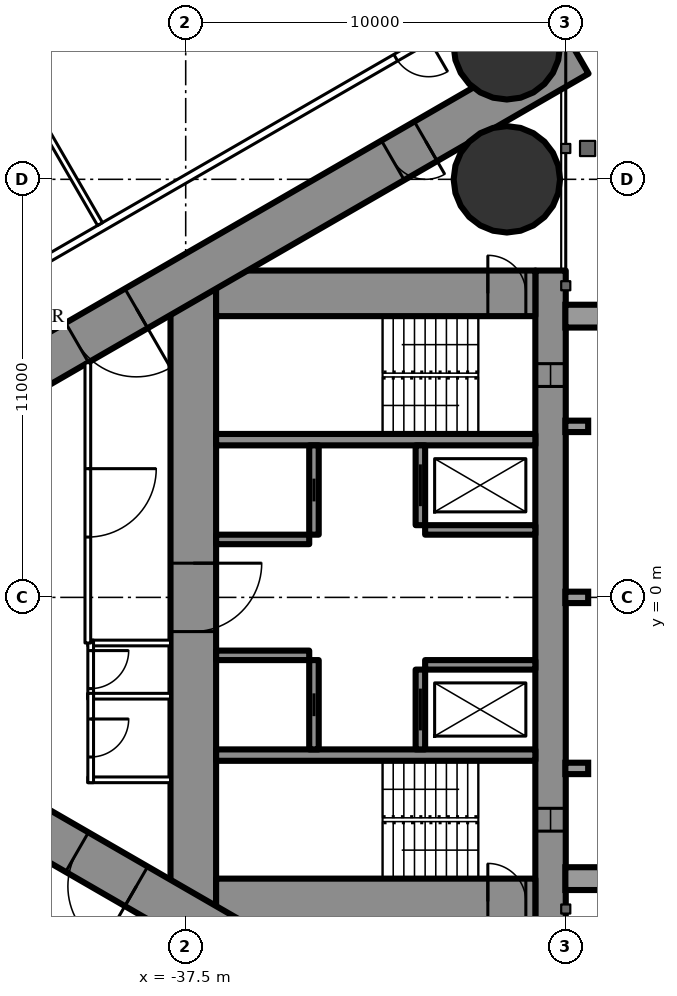
"""IFC4 building model, lengths in metres.
Left out: names, types, materials, properties, quantities, classifications, styles, units other than length and angle.
Written with IfcOpenShell. Run it as: python <this file> out.ifc"""

import sys

from ifc_helpers import new_model, si_unit, direction, frame, frame_2d, origin, origin_2d, place, context, subcontext, project, spatial, rectangle, circle, extrude, element, fill, save


model = new_model("IFC4")
c1 = context("Model", 3, precision=1e-05, world=origin(), true_north=direction((0.0, 1.0)))
c2 = subcontext(c1, "Body", "Model", "MODEL_VIEW")
j1 = project(units=[si_unit("LENGTHUNIT", "METRE"), si_unit("PLANEANGLEUNIT", "RADIAN")], contexts=[c1])
p1 = place(None, origin())
s1 = spatial("IfcSite", under=j1, at=p1, CompositionType="ELEMENT")
p2 = place(p1, origin())
s2 = spatial("IfcBuilding", under=s1, at=p2, CompositionType="ELEMENT")
p3 = place(p2, frame((0.0, 0.0, 173.8)))
s3 = spatial("IfcBuildingStorey", under=s2, at=p3, CompositionType="ELEMENT", Elevation=173.8)
for number, where, z_axis, x_axis in (
    (1, (-29.05, 11.0, 0.0), (0.0, 0.0, 1.0), (1.0, 0.0, 0.0)),
    (2, (-29.05, 14.5, 0.0), (0.0, 0.0, 1.0), (1.0, 0.0, 0.0)),
):
    element("IfcColumn", number, at=place(p3, frame(where, z_axis=z_axis, x_axis=x_axis)), inside=s3, PredefinedType="COLUMN", context=c2, shape_type="SweptSolid", body=[
        extrude(circle(Radius=1.4, at=origin_2d()), origin(), (0.0, 0.0, 1.0), 3.5),
    ])
p4 = place(p3, frame((-27.9, 8.6, 0.0), z_axis=(0.0, 0.0, 1.0), x_axis=(0.0, -1.0, 0.0)))
e3 = element("IfcWall", 3, at=p4, inside=s3, PredefinedType="SHEAR", context=c2, shape_type="SweptSolid", body=[
    extrude(rectangle(XDim=17.2, YDim=0.8, at=frame_2d((8.6, 0.0))), origin(), (0.0, 0.0, 1.0), 3.5),
])
p5 = place(p4, frame((2.45, 0.0, 0.6)))
e4 = element("IfcOpeningElement", 4, at=p5, cuts=e3, PredefinedType="OPENING", context=c2, shape_type="SweptSolid", body=[
    extrude(rectangle(XDim=0.6, YDim=2.1, at=frame_2d((0.3, 1.05))), frame((0.0, 0.41, 0.0), z_axis=(0.0, -1.0, 0.0), x_axis=(1.0, 0.0, 0.0)), (0.0, 0.0, 1.0), 0.82),
])
p6 = place(p4, frame((14.15, 0.0, 0.6)))
e5 = element("IfcOpeningElement", 5, at=p6, cuts=e3, PredefinedType="OPENING", context=c2, shape_type="SweptSolid", body=[
    extrude(rectangle(XDim=0.6, YDim=2.1, at=frame_2d((0.3, 1.05))), frame((0.0, 0.41, 0.0), z_axis=(0.0, -1.0, 0.0), x_axis=(1.0, 0.0, 0.0)), (0.0, 0.0, 1.0), 0.82),
])
p7 = place(p3, frame((-37.3, 8.6, 0.0), z_axis=(0.0, 0.0, 1.0), x_axis=(0.0, -1.0, 0.0)))
e6 = element("IfcWall", 6, at=p7, inside=s3, PredefinedType="SHEAR", context=c2, shape_type="SweptSolid", body=[
    extrude(rectangle(XDim=17.2, YDim=1.2, at=frame_2d((8.6, 0.0))), origin(), (0.0, 0.0, 1.0), 3.5),
])
p8 = place(p7, frame((7.7, 0.0, 0.0)))
e7 = element("IfcOpeningElement", 7, at=p8, cuts=e6, PredefinedType="OPENING", context=c2, shape_type="SweptSolid", body=[
    extrude(rectangle(XDim=1.8, YDim=2.2, at=frame_2d((0.9, 1.1))), frame((0.0, 0.61, 0.0), z_axis=(0.0, -1.0, 0.0), x_axis=(1.0, 0.0, 0.0)), (0.0, 0.0, 1.0), 1.22),
])
p9 = place(p3, frame((-28.3, 8.0, 0.0), z_axis=(0.0, 0.0, 1.0), x_axis=(-1.0, 0.0, 0.0)))
e8 = element("IfcWall", 8, at=p9, inside=s3, PredefinedType="SHEAR", context=c2, shape_type="SweptSolid", body=[
    extrude(rectangle(XDim=8.4, YDim=1.2, at=frame_2d((4.2, 0.0))), origin(), (0.0, 0.0, 1.0), 3.5),
])
p10 = place(p9, frame((0.25, 0.0, 0.0)))
e9 = element("IfcOpeningElement", 9, at=p10, cuts=e8, PredefinedType="OPENING", context=c2, shape_type="SweptSolid", body=[
    extrude(rectangle(XDim=1.0, YDim=2.2, at=frame_2d((0.5, 1.1))), frame((0.0, 0.61, 0.0), z_axis=(0.0, -1.0, 0.0), x_axis=(1.0, 0.0, 0.0)), (0.0, 0.0, 1.0), 1.22),
])
p11 = place(p3, frame((-28.3, -8.0, 0.0), z_axis=(0.0, 0.0, 1.0), x_axis=(-1.0, 0.0, 0.0)))
e10 = element("IfcWall", 10, at=p11, inside=s3, PredefinedType="SHEAR", context=c2, shape_type="SweptSolid", body=[
    extrude(rectangle(XDim=8.4, YDim=1.2, at=frame_2d((4.2, 0.0))), origin(), (0.0, 0.0, 1.0), 3.5),
])
p12 = place(p11, frame((0.25, 0.0, 0.0)))
e11 = element("IfcOpeningElement", 11, at=p12, cuts=e10, PredefinedType="OPENING", context=c2, shape_type="SweptSolid", body=[
    extrude(rectangle(XDim=1.0, YDim=2.2, at=frame_2d((0.5, 1.1))), frame((0.0, 0.61, 0.0), z_axis=(0.0, -1.0, 0.0), x_axis=(1.0, 0.0, 0.0)), (0.0, 0.0, 1.0), 1.22),
])
for number, where, z_axis, x_axis in (
    (12, (-28.3, 4.15, 0.0), (0.0, 0.0, 1.0), (-1.0, 0.0, 0.0)),
    (13, (-28.3, -4.15, 0.0), (0.0, 0.0, 1.0), (-1.0, 0.0, 0.0)),
):
    element("IfcWall", number, at=place(p3, frame(where, z_axis=z_axis, x_axis=x_axis)), inside=s3, PredefinedType="SHEAR", context=c2, shape_type="SweptSolid", body=[
        extrude(rectangle(XDim=8.4, YDim=0.3, at=frame_2d((4.2, 0.0))), origin(), (0.0, 0.0, 1.0), 3.5),
    ])
p13 = place(p3, frame((-31.325, 4.0, 0.0), z_axis=(0.0, 0.0, 1.0), x_axis=(0.0, -1.0, 0.0)))
e14 = element("IfcWall", 14, at=p13, inside=s3, PredefinedType="SHEAR", context=c2, shape_type="SweptSolid", body=[
    extrude(rectangle(XDim=2.1, YDim=0.25, at=frame_2d((1.05, 0.0))), origin(), (0.0, 0.0, 1.0), 3.5),
])
p14 = place(p13, frame((0.5, 0.0, 0.0)))
e15 = element("IfcOpeningElement", 15, at=p14, cuts=e14, PredefinedType="OPENING", context=c2, shape_type="SweptSolid", body=[
    extrude(rectangle(XDim=1.1, YDim=2.2, at=frame_2d((0.55, 1.1))), frame((0.0, 0.135, 0.0), z_axis=(0.0, -1.0, 0.0), x_axis=(1.0, 0.0, 0.0)), (0.0, 0.0, 1.0), 0.27),
])
p15 = place(p3, frame((-34.125, 4.0, 0.0), z_axis=(0.0, 0.0, 1.0), x_axis=(0.0, -1.0, 0.0)))
e16 = element("IfcWall", 16, at=p15, inside=s3, PredefinedType="SHEAR", context=c2, shape_type="SweptSolid", body=[
    extrude(rectangle(XDim=2.35, YDim=0.25, at=frame_2d((1.175, 0.0))), origin(), (0.0, 0.0, 1.0), 3.5),
])
p16 = place(p15, frame((0.875, 0.0, 0.0)))
e17 = element("IfcOpeningElement", 17, at=p16, cuts=e16, PredefinedType="OPENING", context=c2, shape_type="SweptSolid", body=[
    extrude(rectangle(XDim=0.6, YDim=2.0, at=frame_2d((0.3, 1.0))), frame((0.0, 0.135, 0.0), z_axis=(0.0, -1.0, 0.0), x_axis=(1.0, 0.0, 0.0)), (0.0, 0.0, 1.0), 0.27),
])
p17 = place(p3, frame((-28.3, 1.775, 0.0), z_axis=(0.0, 0.0, 1.0), x_axis=(-1.0, 0.0, 0.0)))
e18 = element("IfcWall", 18, at=p17, inside=s3, PredefinedType="SHEAR", context=c2, shape_type="SweptSolid", body=[
    extrude(rectangle(XDim=2.9, YDim=0.25, at=frame_2d((1.45, 0.0))), origin(), (0.0, 0.0, 1.0), 3.5),
])
p18 = place(p3, frame((-34.25, 1.525, 0.0), z_axis=(0.0, 0.0, 1.0), x_axis=(-1.0, 0.0, 0.0)))
e19 = element("IfcWall", 19, at=p18, inside=s3, PredefinedType="SHEAR", context=c2, shape_type="SweptSolid", body=[
    extrude(rectangle(XDim=2.45, YDim=0.25, at=frame_2d((1.225, 0.0))), origin(), (0.0, 0.0, 1.0), 3.5),
])
p19 = place(p3, frame((-31.325, -1.9, 0.0), z_axis=(0.0, 0.0, 1.0), x_axis=(0.0, -1.0, 0.0)))
e20 = element("IfcWall", 20, at=p19, inside=s3, PredefinedType="SHEAR", context=c2, shape_type="SweptSolid", body=[
    extrude(rectangle(XDim=2.1, YDim=0.25, at=frame_2d((1.05, 0.0))), origin(), (0.0, 0.0, 1.0), 3.5),
])
p20 = place(p19, frame((0.5, 0.0, 0.0)))
e21 = element("IfcOpeningElement", 21, at=p20, cuts=e20, PredefinedType="OPENING", context=c2, shape_type="SweptSolid", body=[
    extrude(rectangle(XDim=1.1, YDim=2.2, at=frame_2d((0.55, 1.1))), frame((0.0, 0.135, 0.0), z_axis=(0.0, -1.0, 0.0), x_axis=(1.0, 0.0, 0.0)), (0.0, 0.0, 1.0), 0.27),
])
p21 = place(p3, frame((-34.125, -1.65, 0.0), z_axis=(0.0, 0.0, 1.0), x_axis=(0.0, -1.0, 0.0)))
e22 = element("IfcWall", 22, at=p21, inside=s3, PredefinedType="SHEAR", context=c2, shape_type="SweptSolid", body=[
    extrude(rectangle(XDim=2.35, YDim=0.25, at=frame_2d((1.175, 0.0))), origin(), (0.0, 0.0, 1.0), 3.5),
])
p22 = place(p21, frame((0.875, 0.0, 0.0)))
e23 = element("IfcOpeningElement", 23, at=p22, cuts=e22, PredefinedType="OPENING", context=c2, shape_type="SweptSolid", body=[
    extrude(rectangle(XDim=0.6, YDim=2.0, at=frame_2d((0.3, 1.0))), frame((0.0, 0.135, 0.0), z_axis=(0.0, -1.0, 0.0), x_axis=(1.0, 0.0, 0.0)), (0.0, 0.0, 1.0), 0.27),
])
p23 = place(p3, frame((-28.3, -1.775, 0.0), z_axis=(0.0, 0.0, 1.0), x_axis=(-1.0, 0.0, 0.0)))
e24 = element("IfcWall", 24, at=p23, inside=s3, PredefinedType="SHEAR", context=c2, shape_type="SweptSolid", body=[
    extrude(rectangle(XDim=2.9, YDim=0.25, at=frame_2d((1.45, 0.0))), origin(), (0.0, 0.0, 1.0), 3.5),
])
p24 = place(p3, frame((-34.25, -1.525, 0.0), z_axis=(0.0, 0.0, 1.0), x_axis=(-1.0, 0.0, 0.0)))
e25 = element("IfcWall", 25, at=p24, inside=s3, PredefinedType="SHEAR", context=c2, shape_type="SweptSolid", body=[
    extrude(rectangle(XDim=2.45, YDim=0.25, at=frame_2d((1.225, 0.0))), origin(), (0.0, 0.0, 1.0), 3.5),
])
p25 = place(p3, frame((-27.2, 14.3, 0.0), z_axis=(0.0, 0.0, 1.0), x_axis=(-0.866026593062, -0.499997940104, 0.0)))
e26 = element("IfcWall", 26, at=p25, inside=s3, PredefinedType="SHEAR", context=c2, shape_type="SweptSolid", body=[
    extrude(rectangle(XDim=28.946, YDim=1.2, at=frame_2d((14.473, 0.0))), origin(), (0.0, 0.0, 1.0), 3.5),
])
p26 = place(p25, frame((4.6, 0.0, 0.0)))
e27 = element("IfcOpeningElement", 27, at=p26, cuts=e26, PredefinedType="OPENING", context=c2, shape_type="SweptSolid", body=[
    extrude(rectangle(XDim=1.0, YDim=2.2, at=frame_2d((0.5, 1.1))), frame((0.0, 0.61, 0.0), z_axis=(0.0, -1.0, 0.0), x_axis=(1.0, 0.0, 0.0)), (0.0, 0.0, 1.0), 1.22),
])
p27 = place(p25, frame((13.395, 0.0, 0.0)))
e28 = element("IfcOpeningElement", 28, at=p27, cuts=e26, PredefinedType="OPENING", context=c2, shape_type="SweptSolid", body=[
    extrude(rectangle(XDim=1.8, YDim=2.2, at=frame_2d((0.9, 1.1))), frame((0.0, 0.61, 0.0), z_axis=(0.0, -1.0, 0.0), x_axis=(1.0, 0.0, 0.0)), (0.0, 0.0, 1.0), 1.22),
])
p28 = place(p3, frame((-27.2, -14.3, 0.0), z_axis=(0.0, 0.0, 1.0), x_axis=(-0.866024021859, 0.500002393557, 0.0)))
e29 = element("IfcWall", 29, at=p28, inside=s3, PredefinedType="SHEAR", context=c2, shape_type="SweptSolid", body=[
    extrude(rectangle(XDim=27.907, YDim=1.2, at=frame_2d((13.954, 0.0))), origin(), (0.0, 0.0, 1.0), 3.5),
])
p29 = place(p28, frame((4.6, 0.0, 0.0)))
e30 = element("IfcOpeningElement", 30, at=p29, cuts=e29, PredefinedType="OPENING", context=c2, shape_type="SweptSolid", body=[
    extrude(rectangle(XDim=1.0, YDim=2.2, at=frame_2d((0.5, 1.1))), frame((0.0, 0.61, 0.0), z_axis=(0.0, -1.0, 0.0), x_axis=(1.0, 0.0, 0.0)), (0.0, 0.0, 1.0), 1.22),
])
p30 = place(p28, frame((13.395, 0.0, 0.0)))
e31 = element("IfcOpeningElement", 31, at=p30, cuts=e29, PredefinedType="OPENING", context=c2, shape_type="SweptSolid", body=[
    extrude(rectangle(XDim=1.8, YDim=2.2, at=frame_2d((0.9, 1.1))), frame((0.0, 0.61, 0.0), z_axis=(0.0, -1.0, 0.0), x_axis=(1.0, 0.0, 0.0)), (0.0, 0.0, 1.0), 1.22),
])
p31 = place(p3, frame((-27.86, 16.575, 0.0), z_axis=(0.0, 0.0, 1.0), x_axis=(-0.866025533911, -0.499999774615, 0.0)))
e32 = element("IfcWall", 32, at=p31, inside=s3, PredefinedType="PARTITIONING", context=c2, shape_type="SweptSolid", body=[
    extrude(rectangle(XDim=33.149, YDim=0.2, at=frame_2d((16.575, 0.0))), origin(), (0.0, 0.0, 1.0), 3.25),
])
p32 = place(p31, frame((3.75, 0.0, 0.0)))
e33 = element("IfcOpeningElement", 33, at=p32, cuts=e32, PredefinedType="OPENING", context=c2, shape_type="SweptSolid", body=[
    extrude(rectangle(XDim=1.0, YDim=2.2, at=frame_2d((0.5, 1.1))), frame((0.0, 0.11, 0.0), z_axis=(0.0, -1.0, 0.0), x_axis=(1.0, 0.0, 0.0)), (0.0, 0.0, 1.0), 0.22),
])
p33 = place(p31, frame((20.347, 0.0, 0.0)))
e34 = element("IfcOpeningElement", 34, at=p33, cuts=e32, PredefinedType="OPENING", context=c2, shape_type="SweptSolid", body=[
    extrude(rectangle(XDim=0.95, YDim=2.2, at=frame_2d((0.475, 1.1))), frame((0.0, 0.11, 0.0), z_axis=(0.0, -1.0, 0.0), x_axis=(1.0, 0.0, 0.0)), (0.0, 0.0, 1.0), 0.22),
])
p34 = place(p31, frame((24.397, 0.0, 0.0)))
e35 = element("IfcOpeningElement", 35, at=p34, cuts=e32, PredefinedType="OPENING", context=c2, shape_type="SweptSolid", body=[
    extrude(rectangle(XDim=0.95, YDim=2.2, at=frame_2d((0.475, 1.1))), frame((0.0, 0.11, 0.0), z_axis=(0.0, -1.0, 0.0), x_axis=(1.0, 0.0, 0.0)), (0.0, 0.0, 1.0), 0.22),
])
p35 = place(p31, frame((30.042, 0.0, 0.0)))
e36 = element("IfcOpeningElement", 36, at=p35, cuts=e32, PredefinedType="OPENING", context=c2, shape_type="SweptSolid", body=[
    extrude(rectangle(XDim=0.95, YDim=2.2, at=frame_2d((0.475, 1.1))), frame((0.0, 0.11, 0.0), z_axis=(0.0, -1.0, 0.0), x_axis=(1.0, 0.0, 0.0)), (0.0, 0.0, 1.0), 0.22),
])
p36 = place(p3, frame((-39.754, 9.823, 0.0), z_axis=(0.0, 0.0, 1.0), x_axis=(-0.499997670926, 0.866026748472, 0.0)))
e37 = element("IfcWall", 37, at=p36, inside=s3, PredefinedType="PARTITIONING", context=c2, shape_type="SweptSolid", body=[
    extrude(rectangle(XDim=6.757, YDim=0.15, at=frame_2d((3.379, 0.0))), origin(), (0.0, 0.0, 1.0), 2.3),
])
for number, where, z_axis, x_axis in (
    (38, (-37.9, -1.2, 0.0), (0.0, 0.0, 1.0), (-1.0, 0.0, 0.0)),
    (39, (-37.9, -2.6, 0.0), (0.0, 0.0, 1.0), (-1.0, 0.0, 0.0)),
    (40, (-37.9, -4.8, 0.0), (0.0, 0.0, 1.0), (-1.0, 0.0, 0.0)),
):
    element("IfcWall", number, at=place(p3, frame(where, z_axis=z_axis, x_axis=x_axis)), inside=s3, PredefinedType="PARTITIONING", context=c2, shape_type="SweptSolid", body=[
        extrude(rectangle(XDim=2.175, YDim=0.15, at=frame_2d((1.087, 0.0))), origin(), (0.0, 0.0, 1.0), 3.25),
    ])
p37 = place(p3, frame((-40.0, -1.125, 0.0), z_axis=(0.0, 0.0, 1.0), x_axis=(0.0, -1.0, 0.0)))
e41 = element("IfcWall", 41, at=p37, inside=s3, PredefinedType="PARTITIONING", context=c2, shape_type="SweptSolid", body=[
    extrude(rectangle(XDim=1.55, YDim=0.15, at=frame_2d((0.775, 0.0))), origin(), (0.0, 0.0, 1.0), 3.25),
])
p38 = place(p37, frame((0.275, 0.0, 0.0)))
e42 = element("IfcOpeningElement", 42, at=p38, cuts=e41, PredefinedType="OPENING", context=c2, shape_type="SweptSolid", body=[
    extrude(rectangle(XDim=1.0, YDim=2.2, at=frame_2d((0.5, 1.1))), frame((0.0, 0.085, 0.0), z_axis=(0.0, -1.0, 0.0), x_axis=(1.0, 0.0, 0.0)), (0.0, 0.0, 1.0), 0.17),
])
p39 = place(p3, frame((-40.0, -2.525, 0.0), z_axis=(0.0, 0.0, 1.0), x_axis=(0.0, -1.0, 0.0)))
e43 = element("IfcWall", 43, at=p39, inside=s3, PredefinedType="PARTITIONING", context=c2, shape_type="SweptSolid", body=[
    extrude(rectangle(XDim=2.35, YDim=0.15, at=frame_2d((1.175, 0.0))), origin(), (0.0, 0.0, 1.0), 3.25),
])
p40 = place(p39, frame((0.675, 0.0, 0.0)))
e44 = element("IfcOpeningElement", 44, at=p40, cuts=e43, PredefinedType="OPENING", context=c2, shape_type="SweptSolid", body=[
    extrude(rectangle(XDim=1.0, YDim=2.2, at=frame_2d((0.5, 1.1))), frame((0.0, 0.085, 0.0), z_axis=(0.0, -1.0, 0.0), x_axis=(1.0, 0.0, 0.0)), (0.0, 0.0, 1.0), 0.17),
])
p41 = place(p3, frame((-40.075, 6.174, 0.0), z_axis=(0.0, 0.0, 1.0), x_axis=(0.0, -1.0, 0.0)))
e45 = element("IfcWall", 45, at=p41, inside=s3, PredefinedType="PARTITIONING", context=c2, shape_type="SweptSolid", body=[
    extrude(rectangle(XDim=7.374, YDim=0.15, at=frame_2d((3.687, 0.0))), origin(), (0.0, 0.0, 1.0), 3.25),
])
p42 = place(p41, frame((2.787, 0.0, 0.0)))
e46 = element("IfcOpeningElement", 46, at=p42, cuts=e45, PredefinedType="OPENING", context=c2, shape_type="SweptSolid", body=[
    extrude(rectangle(XDim=1.8, YDim=2.2, at=frame_2d((0.9, 1.1))), frame((0.0, 0.085, 0.0), z_axis=(0.0, -1.0, 0.0), x_axis=(1.0, 0.0, 0.0)), (0.0, 0.0, 1.0), 0.17),
])
p43 = place(p3, frame((-39.758, -11.697, 0.0), z_axis=(0.0, 0.0, 1.0), x_axis=(-0.866024194504, 0.500002094529, 0.0)))
e47 = element("IfcWall", 47, at=p43, inside=s3, PredefinedType="PARTITIONING", context=c2, shape_type="SweptSolid", body=[
    extrude(rectangle(XDim=6.6, YDim=0.25, at=frame_2d((3.3, 0.0))), origin(), (0.0, 0.0, 1.0), 3.25),
])
p44 = place(p43, frame((0.75, 0.0, 0.0)))
e48 = element("IfcOpeningElement", 48, at=p44, cuts=e47, PredefinedType="OPENING", context=c2, shape_type="SweptSolid", body=[
    extrude(rectangle(XDim=1.1, YDim=2.2, at=frame_2d((0.55, 1.1))), frame((0.0, 0.135, 0.0), z_axis=(0.0, -1.0, 0.0), x_axis=(1.0, 0.0, 0.0)), (0.0, 0.0, 1.0), 0.27),
])
p45 = place(p43, frame((2.75, 0.0, 0.0)))
e49 = element("IfcOpeningElement", 49, at=p45, cuts=e47, PredefinedType="OPENING", context=c2, shape_type="SweptSolid", body=[
    extrude(rectangle(XDim=1.1, YDim=2.2, at=frame_2d((0.55, 1.1))), frame((0.0, 0.135, 0.0), z_axis=(0.0, -1.0, 0.0), x_axis=(1.0, 0.0, 0.0)), (0.0, 0.0, 1.0), 0.27),
])
p46 = place(p43, frame((4.75, 0.0, 0.0)))
e50 = element("IfcOpeningElement", 50, at=p46, cuts=e47, PredefinedType="OPENING", context=c2, shape_type="SweptSolid", body=[
    extrude(rectangle(XDim=1.1, YDim=2.2, at=frame_2d((0.55, 1.1))), frame((0.0, 0.135, 0.0), z_axis=(0.0, -1.0, 0.0), x_axis=(1.0, 0.0, 0.0)), (0.0, 0.0, 1.0), 0.27),
])
p47 = place(p32, origin())
e51 = element("IfcDoor", 51, at=p47, inside=s3, OperationType="SINGLE_SWING_LEFT", PredefinedType="DOOR", context=c2, shape_type="SweptSolid", body=[
    extrude(rectangle(XDim=1.0, YDim=2.2, at=frame_2d((0.5, 1.1))), frame((0.0, 0.025, 0.0), z_axis=(0.0, -1.0, 0.0), x_axis=(1.0, 0.0, 0.0)), (0.0, 0.0, 1.0), 0.05),
])
fill(e33, e51)
p48 = place(p38, origin())
e52 = element("IfcDoor", 52, at=p48, inside=s3, OperationType="SINGLE_SWING_LEFT", PredefinedType="DOOR", context=c2, shape_type="SweptSolid", body=[
    extrude(rectangle(XDim=1.0, YDim=2.2, at=frame_2d((0.5, 1.1))), frame((0.0, 0.025, 0.0), z_axis=(0.0, -1.0, 0.0), x_axis=(1.0, 0.0, 0.0)), (0.0, 0.0, 1.0), 0.05),
])
fill(e42, e52)
p49 = place(p40, origin())
e53 = element("IfcDoor", 53, at=p49, inside=s3, OperationType="SINGLE_SWING_LEFT", PredefinedType="DOOR", context=c2, shape_type="SweptSolid", body=[
    extrude(rectangle(XDim=1.0, YDim=2.2, at=frame_2d((0.5, 1.1))), frame((0.0, 0.025, 0.0), z_axis=(0.0, -1.0, 0.0), x_axis=(1.0, 0.0, 0.0)), (0.0, 0.0, 1.0), 0.05),
])
fill(e44, e53)
p50 = place(p42, origin())
e54 = element("IfcDoor", 54, at=p50, inside=s3, OperationType="DOUBLE_DOOR_SINGLE_SWING", PredefinedType="DOOR", context=c2, shape_type="SweptSolid", body=[
    extrude(rectangle(XDim=1.8, YDim=2.2, at=frame_2d((0.9, 1.1))), frame((0.0, 0.025, 0.0), z_axis=(0.0, -1.0, 0.0), x_axis=(1.0, 0.0, 0.0)), (0.0, 0.0, 1.0), 0.05),
])
fill(e46, e54)
p51 = place(p26, origin())
e55 = element("IfcDoor", 55, at=p51, inside=s3, OperationType="SINGLE_SWING_LEFT", PredefinedType="DOOR", context=c2, shape_type="SweptSolid", body=[
    extrude(rectangle(XDim=1.0, YDim=2.2, at=frame_2d((0.5, 1.1))), frame((0.0, 0.025, 0.0), z_axis=(0.0, -1.0, 0.0), x_axis=(1.0, 0.0, 0.0)), (0.0, 0.0, 1.0), 0.05),
])
fill(e27, e55)
p52 = place(p27, origin())
e56 = element("IfcDoor", 56, at=p52, inside=s3, OperationType="DOUBLE_DOOR_SINGLE_SWING", PredefinedType="DOOR", context=c2, shape_type="SweptSolid", body=[
    extrude(rectangle(XDim=1.8, YDim=2.2, at=frame_2d((0.9, 1.1))), frame((0.0, 0.025, 0.0), z_axis=(0.0, -1.0, 0.0), x_axis=(1.0, 0.0, 0.0)), (0.0, 0.0, 1.0), 0.05),
])
fill(e28, e56)
p53 = place(p30, origin())
e57 = element("IfcDoor", 57, at=p53, inside=s3, OperationType="DOUBLE_DOOR_SINGLE_SWING", PredefinedType="DOOR", context=c2, shape_type="SweptSolid", body=[
    extrude(rectangle(XDim=1.8, YDim=2.2, at=frame_2d((0.9, 1.1))), frame((0.0, 0.025, 0.0), z_axis=(0.0, -1.0, 0.0), x_axis=(1.0, 0.0, 0.0)), (0.0, 0.0, 1.0), 0.05),
])
fill(e31, e57)
p54 = place(p8, origin())
e58 = element("IfcDoor", 58, at=p54, inside=s3, OperationType="DOUBLE_DOOR_SINGLE_SWING", PredefinedType="DOOR", context=c2, shape_type="SweptSolid", body=[
    extrude(rectangle(XDim=1.8, YDim=2.2, at=frame_2d((0.9, 1.1))), frame((0.0, 0.025, 0.0), z_axis=(0.0, -1.0, 0.0), x_axis=(1.0, 0.0, 0.0)), (0.0, 0.0, 1.0), 0.05),
])
fill(e7, e58)
p55 = place(p10, origin())
e59 = element("IfcDoor", 59, at=p55, inside=s3, OperationType="SINGLE_SWING_RIGHT", PredefinedType="DOOR", context=c2, shape_type="SweptSolid", body=[
    extrude(rectangle(XDim=1.0, YDim=2.2, at=frame_2d((0.5, 1.1))), frame((0.0, 0.025, 0.0), z_axis=(0.0, -1.0, 0.0), x_axis=(1.0, 0.0, 0.0)), (0.0, 0.0, 1.0), 0.05),
])
fill(e9, e59)
p56 = place(p12, origin())
e60 = element("IfcDoor", 60, at=p56, inside=s3, OperationType="SINGLE_SWING_RIGHT", PredefinedType="DOOR", context=c2, shape_type="SweptSolid", body=[
    extrude(rectangle(XDim=1.0, YDim=2.2, at=frame_2d((0.5, 1.1))), frame((0.0, 0.025, 0.0), z_axis=(0.0, -1.0, 0.0), x_axis=(1.0, 0.0, 0.0)), (0.0, 0.0, 1.0), 0.05),
])
fill(e11, e60)
p57 = place(p14, origin())
e61 = element("IfcDoor", 61, at=p57, inside=s3, OperationType="SLIDING_TO_LEFT", PredefinedType="USERDEFINED", context=c2, shape_type="SweptSolid", body=[
    extrude(rectangle(XDim=1.1, YDim=2.2, at=frame_2d((0.55, 1.1))), frame((0.0, 0.025, 0.0), z_axis=(0.0, -1.0, 0.0), x_axis=(1.0, 0.0, 0.0)), (0.0, 0.0, 1.0), 0.05),
])
fill(e15, e61)
p58 = place(p20, origin())
e62 = element("IfcDoor", 62, at=p58, inside=s3, OperationType="SLIDING_TO_LEFT", PredefinedType="USERDEFINED", context=c2, shape_type="SweptSolid", body=[
    extrude(rectangle(XDim=1.1, YDim=2.2, at=frame_2d((0.55, 1.1))), frame((0.0, 0.025, 0.0), z_axis=(0.0, -1.0, 0.0), x_axis=(1.0, 0.0, 0.0)), (0.0, 0.0, 1.0), 0.05),
])
fill(e21, e62)
p59 = place(p16, origin())
e63 = element("IfcDoor", 63, at=p59, inside=s3, OperationType="SLIDING_TO_LEFT", PredefinedType="DOOR", context=c2, shape_type="SweptSolid", body=[
    extrude(rectangle(XDim=0.6, YDim=2.0, at=frame_2d((0.3, 1.0))), frame((0.0, 0.025, 0.0), z_axis=(0.0, -1.0, 0.0), x_axis=(1.0, 0.0, 0.0)), (0.0, 0.0, 1.0), 0.05),
])
fill(e17, e63)
p60 = place(p22, origin())
e64 = element("IfcDoor", 64, at=p60, inside=s3, OperationType="SLIDING_TO_LEFT", PredefinedType="DOOR", context=c2, shape_type="SweptSolid", body=[
    extrude(rectangle(XDim=0.6, YDim=2.0, at=frame_2d((0.3, 1.0))), frame((0.0, 0.025, 0.0), z_axis=(0.0, -1.0, 0.0), x_axis=(1.0, 0.0, 0.0)), (0.0, 0.0, 1.0), 0.05),
])
fill(e23, e64)
p61 = place(p5, origin())
e65 = element("IfcWindow", 65, at=p61, inside=s3, PartitioningType="SINGLE_PANEL", PredefinedType="WINDOW", context=c2, shape_type="SweptSolid", body=[
    extrude(rectangle(XDim=0.6, YDim=2.1, at=frame_2d((0.3, 1.05))), frame((0.0, 0.03, 0.0), z_axis=(0.0, -1.0, 0.0), x_axis=(1.0, 0.0, 0.0)), (0.0, 0.0, 1.0), 0.06),
])
fill(e4, e65)
p62 = place(p6, origin())
e66 = element("IfcWindow", 66, at=p62, inside=s3, PartitioningType="SINGLE_PANEL", PredefinedType="WINDOW", context=c2, shape_type="SweptSolid", body=[
    extrude(rectangle(XDim=0.6, YDim=2.1, at=frame_2d((0.3, 1.05))), frame((0.0, 0.03, 0.0), z_axis=(0.0, -1.0, 0.0), x_axis=(1.0, 0.0, 0.0)), (0.0, 0.0, 1.0), 0.06),
])
fill(e5, e66)
save(model, sys.argv[1])
